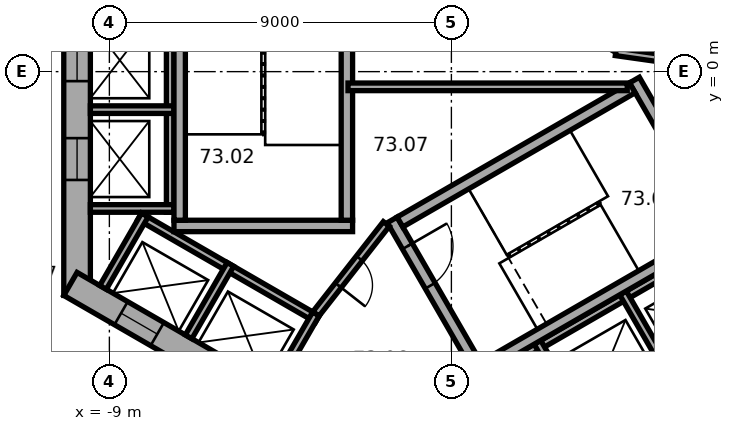
"""IFC4 building model, lengths in metres.
Left out: names, types, materials, properties, quantities, classifications, styles, units other than length and angle.
Written with IfcOpenShell. Run it as: python <this file> out.ifc"""

import sys

from ifc_helpers import new_model, si_unit, direction, frame, frame_2d, origin, place, context, subcontext, project, spatial, rectangle, extrude, element, fill, save


model = new_model("IFC4")
c1 = context("Model", 3, precision=1e-05, world=origin(), true_north=direction((0.0, 1.0)))
c2 = subcontext(c1, "Body", "Model", "MODEL_VIEW")
j1 = project(units=[si_unit("LENGTHUNIT", "METRE"), si_unit("PLANEANGLEUNIT", "RADIAN")], contexts=[c1])
p1 = place(None, origin())
s1 = spatial("IfcSite", under=j1, at=p1, CompositionType="ELEMENT")
p2 = place(p1, origin())
s2 = spatial("IfcBuilding", under=s1, at=p2, CompositionType="ELEMENT")
p3 = place(p2, frame((0.0, 0.0, 296.8)))
s3 = spatial("IfcBuildingStorey", under=s2, at=p3, CompositionType="ELEMENT", Elevation=296.8)
p4 = place(p3, frame((-9.85, 5.889, 0.0), z_axis=(0.0, 0.0, 1.0), x_axis=(0.0, -1.0, 0.0)))
e1 = element("IfcWall", 1, at=p4, inside=s3, PredefinedType="SHEAR", context=c2, shape_type="SweptSolid", body=[
    extrude(rectangle(XDim=11.778, YDim=0.7, at=frame_2d((5.889, 0.0))), origin(), (0.0, 0.0, 1.0), 3.7),
])
p5 = place(p4, frame((5.039, 0.0, 0.0)))
e2 = element("IfcOpeningElement", 2, at=p5, cuts=e1, PredefinedType="OPENING", context=c2, shape_type="SweptSolid", body=[
    extrude(rectangle(XDim=1.1, YDim=2.1, at=frame_2d((0.55, 1.05))), frame((0.0, 0.36, 0.0), z_axis=(0.0, -1.0, 0.0), x_axis=(1.0, 0.0, 0.0)), (0.0, 0.0, 1.0), 0.72),
])
p6 = place(p4, frame((7.639, 0.0, 0.0)))
e3 = element("IfcOpeningElement", 3, at=p6, cuts=e1, PredefinedType="OPENING", context=c2, shape_type="SweptSolid", body=[
    extrude(rectangle(XDim=1.1, YDim=2.1, at=frame_2d((0.55, 1.05))), frame((0.0, 0.36, 0.0), z_axis=(0.0, -1.0, 0.0), x_axis=(1.0, 0.0, 0.0)), (0.0, 0.0, 1.0), 0.72),
])
p7 = place(p3, frame((-10.025, -5.586, 0.0), z_axis=(0.0, 0.0, 1.0), x_axis=(0.866026453023, -0.499998182661, 0.0)))
e4 = element("IfcWall", 4, at=p7, inside=s3, PredefinedType="SHEAR", context=c2, shape_type="SweptSolid", body=[
    extrude(rectangle(XDim=11.778, YDim=0.7, at=frame_2d((5.889, 0.0))), origin(), (0.0, 0.0, 1.0), 3.7),
])
p8 = place(p7, frame((6.089, 0.0, 0.0)))
e5 = element("IfcOpeningElement", 5, at=p8, cuts=e4, PredefinedType="OPENING", context=c2, shape_type="SweptSolid", body=[
    extrude(rectangle(XDim=1.5, YDim=2.1, at=frame_2d((0.75, 1.05))), frame((0.0, 0.36, 0.0), z_axis=(0.0, -1.0, 0.0), x_axis=(1.0, 0.0, 0.0)), (0.0, 0.0, 1.0), 0.72),
])
p9 = place(p7, frame((1.539, 0.0, 0.0)))
e6 = element("IfcOpeningElement", 6, at=p9, cuts=e4, PredefinedType="OPENING", context=c2, shape_type="SweptSolid", body=[
    extrude(rectangle(XDim=1.1, YDim=2.1, at=frame_2d((0.55, 1.05))), frame((0.0, 0.36, 0.0), z_axis=(0.0, -1.0, 0.0), x_axis=(1.0, 0.0, 0.0)), (0.0, 0.0, 1.0), 0.72),
])
p10 = place(p7, frame((4.139, 0.0, 0.0)))
e7 = element("IfcOpeningElement", 7, at=p10, cuts=e4, PredefinedType="OPENING", context=c2, shape_type="SweptSolid", body=[
    extrude(rectangle(XDim=1.1, YDim=2.1, at=frame_2d((0.55, 1.05))), frame((0.0, 0.36, 0.0), z_axis=(0.0, -1.0, 0.0), x_axis=(1.0, 0.0, 0.0)), (0.0, 0.0, 1.0), 0.72),
])
p11 = place(p3, frame((-0.175, -11.475, 0.0), z_axis=(0.0, 0.0, 1.0), x_axis=(0.866026453023, 0.499998182661, 0.0)))
e8 = element("IfcWall", 8, at=p11, inside=s3, PredefinedType="SHEAR", context=c2, shape_type="SweptSolid", body=[
    extrude(rectangle(XDim=11.778, YDim=0.7, at=frame_2d((5.889, 0.0))), origin(), (0.0, 0.0, 1.0), 3.7),
])
p12 = place(p11, frame((2.439, 0.0, 0.0)))
e9 = element("IfcOpeningElement", 9, at=p12, cuts=e8, PredefinedType="OPENING", context=c2, shape_type="SweptSolid", body=[
    extrude(rectangle(XDim=1.1, YDim=2.1, at=frame_2d((0.55, 1.05))), frame((0.0, 0.36, 0.0), z_axis=(0.0, -1.0, 0.0), x_axis=(1.0, 0.0, 0.0)), (0.0, 0.0, 1.0), 0.72),
])
p13 = place(p11, frame((5.039, 0.0, 0.0)))
e10 = element("IfcOpeningElement", 10, at=p13, cuts=e8, PredefinedType="OPENING", context=c2, shape_type="SweptSolid", body=[
    extrude(rectangle(XDim=1.1, YDim=2.1, at=frame_2d((0.55, 1.05))), frame((0.0, 0.36, 0.0), z_axis=(0.0, -1.0, 0.0), x_axis=(1.0, 0.0, 0.0)), (0.0, 0.0, 1.0), 0.72),
])
p14 = place(p11, frame((7.639, 0.0, 0.0)))
e11 = element("IfcOpeningElement", 11, at=p14, cuts=e8, PredefinedType="OPENING", context=c2, shape_type="SweptSolid", body=[
    extrude(rectangle(XDim=1.1, YDim=2.1, at=frame_2d((0.55, 1.05))), frame((0.0, 0.36, 0.0), z_axis=(0.0, -1.0, 0.0), x_axis=(1.0, 0.0, 0.0)), (0.0, 0.0, 1.0), 0.72),
])
p15 = place(p3, frame((-7.4, 4.3, 0.0), z_axis=(0.0, 0.0, 1.0), x_axis=(0.0, -1.0, 0.0)))
e12 = element("IfcWall", 12, at=p15, inside=s3, PredefinedType="PARTITIONING", context=c2, shape_type="SweptSolid", body=[
    extrude(rectangle(XDim=8.0, YDim=0.2, at=frame_2d((4.0, 0.0))), origin(), (0.0, 0.0, 1.0), 3.35),
])
for number, where, z_axis, x_axis in (
    (13, (-7.3, -1.0, 0.0), (0.0, 0.0, 1.0), (-1.0, 0.0, 0.0)),
    (14, (-7.3, -3.6, 0.0), (0.0, 0.0, 1.0), (-1.0, 0.0, 0.0)),
):
    element("IfcWall", number, at=place(p3, frame(where, z_axis=z_axis, x_axis=x_axis)), inside=s3, PredefinedType="PARTITIONING", context=c2, shape_type="SweptSolid", body=[
        extrude(rectangle(XDim=2.2, YDim=0.2, at=frame_2d((1.1, 0.0))), origin(), (0.0, 0.0, 1.0), 3.35),
    ])
p16 = place(p3, frame((-8.203, -3.809, 0.0), z_axis=(0.0, 0.0, 1.0), x_axis=(0.866028230842, -0.499995103361, 0.0)))
e15 = element("IfcWall", 15, at=p16, inside=s3, PredefinedType="PARTITIONING", context=c2, shape_type="SweptSolid", body=[
    extrude(rectangle(XDim=5.4, YDim=0.2, at=frame_2d((2.7, 0.0))), origin(), (0.0, 0.0, 1.0), 3.35),
])
for number, where, z_axis, x_axis in (
    (16, (-8.067, -3.772, 0.0), (0.0, 0.0, 1.0), (-0.5, -0.866, 0.0)),
    (17, (-5.815, -5.072, 0.0), (0.0, 0.0, 1.0), (-0.5, -0.866, 0.0)),
):
    element("IfcWall", number, at=place(p3, frame(where, z_axis=z_axis, x_axis=x_axis)), inside=s3, PredefinedType="PARTITIONING", context=c2, shape_type="SweptSolid", body=[
        extrude(rectangle(XDim=2.2, YDim=0.2, at=frame_2d((1.1, 0.0))), origin(), (0.0, 0.0, 1.0), 3.35),
    ])
p17 = place(p3, frame((-3.563, -6.372, 0.0), z_axis=(0.0, 0.0, 1.0), x_axis=(-0.499994660107, -0.866028486751, 0.0)))
e18 = element("IfcWall", 18, at=p17, inside=s3, PredefinedType="PARTITIONING", context=c2, shape_type="SweptSolid", body=[
    extrude(rectangle(XDim=2.2, YDim=0.2, at=frame_2d((1.1, 0.0))), origin(), (0.0, 0.0, 1.0), 3.35),
])
p18 = place(p3, frame((-0.024, -8.559, 0.0), z_axis=(0.0, 0.0, 1.0), x_axis=(0.866026010844, 0.49999894854, 0.0)))
e19 = element("IfcWall", 19, at=p18, inside=s3, PredefinedType="PARTITIONING", context=c2, shape_type="SweptSolid", body=[
    extrude(rectangle(XDim=8.0, YDim=0.2, at=frame_2d((4.0, 0.0))), origin(), (0.0, 0.0, 1.0), 3.35),
])
for number, where, z_axis, x_axis in (
    (20, (2.264, -7.122, 0.0), (0.0, 0.0, 1.0), (0.5, -0.866, 0.0)),
    (21, (4.516, -5.822, 0.0), (0.0, 0.0, 1.0), (0.5, -0.866, 0.0)),
):
    element("IfcWall", number, at=place(p3, frame(where, z_axis=z_axis, x_axis=x_axis)), inside=s3, PredefinedType="PARTITIONING", context=c2, shape_type="SweptSolid", body=[
        extrude(rectangle(XDim=2.2, YDim=0.2, at=frame_2d((1.1, 0.0))), origin(), (0.0, 0.0, 1.0), 3.35),
    ])
p19 = place(p3, frame((-2.6, -4.06, 0.0), z_axis=(0.0, 0.0, 1.0), x_axis=(-1.0, 0.0, 0.0)))
e22 = element("IfcWall", 22, at=p19, inside=s3, PredefinedType="SHEAR", context=c2, shape_type="SweptSolid", body=[
    extrude(rectangle(XDim=4.7, YDim=0.3, at=frame_2d((2.35, 0.0))), origin(), (0.0, 0.0, 1.0), 3.35),
])
for number, where, z_axis, x_axis in (
    (23, (-2.75, 3.15, 0.0), (0.0, 0.0, 1.0), (0.0, -1.0, 0.0)),
    (24, (-7.15, 3.15, 0.0), (0.0, 0.0, 1.0), (0.0, -1.0, 0.0)),
):
    element("IfcWall", number, at=place(p3, frame(where, z_axis=z_axis, x_axis=x_axis)), inside=s3, PredefinedType="SHEAR", context=c2, shape_type="SweptSolid", body=[
        extrude(rectangle(XDim=7.06, YDim=0.3, at=frame_2d((3.53, 0.0))), origin(), (0.0, 0.0, 1.0), 3.35),
    ])
p20 = place(p3, frame((-1.558, -3.902, 0.0), z_axis=(0.0, 0.0, 1.0), x_axis=(0.499977259774, -0.866038532462, 0.0)))
e25 = element("IfcWall", 25, at=p20, inside=s3, PredefinedType="SHEAR", context=c2, shape_type="SweptSolid", body=[
    extrude(rectangle(XDim=4.7, YDim=0.3, at=frame_2d((2.35, 0.0))), origin(), (0.0, 0.0, 1.0), 3.35),
])
p21 = place(p20, frame((0.8, 0.0, 0.0)))
e26 = element("IfcOpeningElement", 26, at=p21, cuts=e25, PredefinedType="OPENING", context=c2, shape_type="SweptSolid", body=[
    extrude(rectangle(XDim=1.2, YDim=2.1, at=frame_2d((0.6, 1.05))), frame((0.0, 0.16, 0.0), z_axis=(0.0, -1.0, 0.0), x_axis=(1.0, 0.0, 0.0)), (0.0, 0.0, 1.0), 0.32),
])
p22 = place(p3, frame((4.816, -0.222, 0.0), z_axis=(0.0, 0.0, 1.0), x_axis=(0.499977259774, -0.866038532462, 0.0)))
e27 = element("IfcWall", 27, at=p22, inside=s3, PredefinedType="SHEAR", context=c2, shape_type="SweptSolid", body=[
    extrude(rectangle(XDim=4.7, YDim=0.3, at=frame_2d((2.35, 0.0))), origin(), (0.0, 0.0, 1.0), 3.35),
])
for number, where, z_axis, x_axis in (
    (28, (-1.353, -3.957, 0.0), (0.0, 0.0, 1.0), (0.866, 0.5, 0.0)),
    (29, (0.847, -7.767, 0.0), (0.0, 0.0, 1.0), (0.866, 0.5, 0.0)),
):
    element("IfcWall", number, at=place(p3, frame(where, z_axis=z_axis, x_axis=x_axis)), inside=s3, PredefinedType="SHEAR", context=c2, shape_type="SweptSolid", body=[
        extrude(rectangle(XDim=7.06, YDim=0.3, at=frame_2d((3.53, 0.0))), origin(), (0.0, 0.0, 1.0), 3.35),
    ])
p23 = place(p3, frame((4.327, 0.521, 0.0), z_axis=(0.0, 0.0, 1.0), x_axis=(0.990124376366, -0.14019172346, 0.0)))
e30 = element("IfcWall", 30, at=p23, inside=s3, PredefinedType="PARTITIONING", context=c2, shape_type="SweptSolid", body=[
    extrude(rectangle(XDim=3.002, YDim=0.2, at=frame_2d((1.501, 0.0))), origin(), (0.0, 0.0, 1.0), 3.35),
])
p24 = place(p23, frame((1.15, 0.0, 0.0)))
e31 = element("IfcOpeningElement", 31, at=p24, cuts=e30, PredefinedType="OPENING", context=c2, shape_type="SweptSolid", body=[
    extrude(rectangle(XDim=0.9, YDim=2.1, at=frame_2d((0.45, 1.05))), frame((0.0, 0.11, 0.0), z_axis=(0.0, -1.0, 0.0), x_axis=(1.0, 0.0, 0.0)), (0.0, 0.0, 1.0), 0.22),
])
p25 = place(p3, frame((-1.712, -4.008, 0.0), z_axis=(0.0, 0.0, 1.0), x_axis=(-0.616549420702, -0.787316208287, 0.0)))
e32 = element("IfcWall", 32, at=p25, inside=s3, PredefinedType="PARTITIONING", context=c2, shape_type="SweptSolid", body=[
    extrude(rectangle(XDim=3.002, YDim=0.2, at=frame_2d((1.501, 0.0))), origin(), (0.0, 0.0, 1.0), 3.35),
])
p26 = place(p25, frame((1.15, 0.0, 0.0)))
e33 = element("IfcOpeningElement", 33, at=p26, cuts=e32, PredefinedType="OPENING", context=c2, shape_type="SweptSolid", body=[
    extrude(rectangle(XDim=0.9, YDim=2.1, at=frame_2d((0.45, 1.05))), frame((0.0, 0.11, 0.0), z_axis=(0.0, -1.0, 0.0), x_axis=(1.0, 0.0, 0.0)), (0.0, 0.0, 1.0), 0.22),
])
p27 = place(p3, frame((-2.72, -0.4, 0.0), z_axis=(0.0, 0.0, 1.0), x_axis=(1.0, 0.0, 0.0)))
e34 = element("IfcWall", 34, at=p27, inside=s3, PredefinedType="PARTITIONING", context=c2, shape_type="SweptSolid", body=[
    extrude(rectangle(XDim=7.347, YDim=0.2, at=frame_2d((3.674, 0.0))), origin(), (0.0, 0.0, 1.0), 3.35),
])
p28 = place(p21, origin())
e35 = element("IfcDoor", 35, at=p28, inside=s3, OperationType="SINGLE_SWING_RIGHT", PredefinedType="DOOR", context=c2, shape_type="SweptSolid", body=[
    extrude(rectangle(XDim=1.2, YDim=2.1, at=frame_2d((0.6, 1.05))), frame((0.0, 0.025, 0.0), z_axis=(0.0, -1.0, 0.0), x_axis=(1.0, 0.0, 0.0)), (0.0, 0.0, 1.0), 0.05),
])
fill(e26, e35)
p29 = place(p26, origin())
e36 = element("IfcDoor", 36, at=p29, inside=s3, OperationType="SINGLE_SWING_LEFT", PredefinedType="DOOR", context=c2, shape_type="SweptSolid", body=[
    extrude(rectangle(XDim=0.9, YDim=2.1, at=frame_2d((0.45, 1.05))), frame((0.0, 0.025, 0.0), z_axis=(0.0, -1.0, 0.0), x_axis=(1.0, 0.0, 0.0)), (0.0, 0.0, 1.0), 0.05),
])
fill(e33, e36)
p30 = place(p5, origin())
e37 = element("IfcDoor", 37, at=p30, inside=s3, OperationType="DOUBLE_DOOR_SLIDING", PredefinedType="DOOR", context=c2, shape_type="SweptSolid", body=[
    extrude(rectangle(XDim=1.1, YDim=2.1, at=frame_2d((0.55, 1.05))), frame((0.0, 0.025, 0.0), z_axis=(0.0, -1.0, 0.0), x_axis=(1.0, 0.0, 0.0)), (0.0, 0.0, 1.0), 0.05),
])
fill(e2, e37)
p31 = place(p6, origin())
e38 = element("IfcDoor", 38, at=p31, inside=s3, OperationType="DOUBLE_DOOR_SLIDING", PredefinedType="DOOR", context=c2, shape_type="SweptSolid", body=[
    extrude(rectangle(XDim=1.1, YDim=2.1, at=frame_2d((0.55, 1.05))), frame((0.0, 0.025, 0.0), z_axis=(0.0, -1.0, 0.0), x_axis=(1.0, 0.0, 0.0)), (0.0, 0.0, 1.0), 0.05),
])
fill(e3, e38)
p32 = place(p9, origin())
e39 = element("IfcDoor", 39, at=p32, inside=s3, OperationType="DOUBLE_DOOR_SLIDING", PredefinedType="DOOR", context=c2, shape_type="SweptSolid", body=[
    extrude(rectangle(XDim=1.1, YDim=2.1, at=frame_2d((0.55, 1.05))), frame((0.0, 0.025, 0.0), z_axis=(0.0, -1.0, 0.0), x_axis=(1.0, 0.0, 0.0)), (0.0, 0.0, 1.0), 0.05),
])
fill(e6, e39)
save(model, sys.argv[1])
